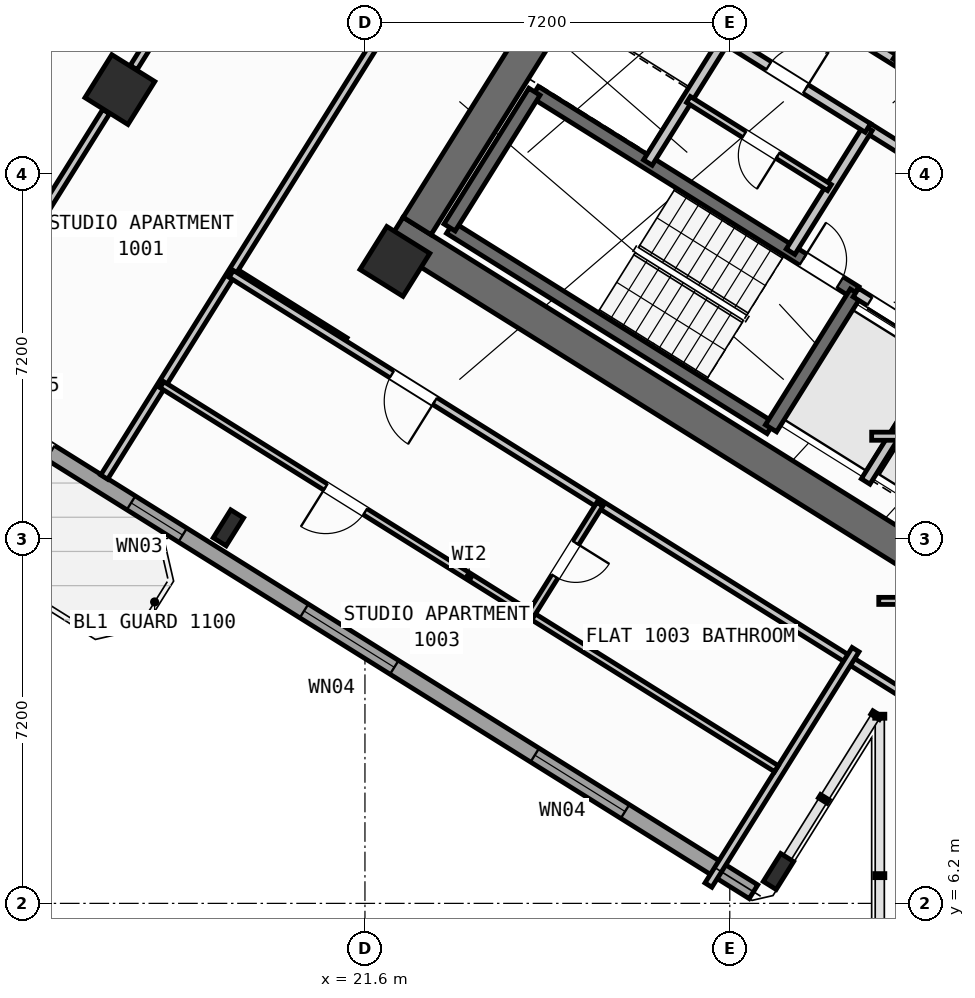
"""IFC4 building model, lengths in metres.
Left out: names, types, materials, properties, quantities, classifications, styles, units other than length and angle.
Written with IfcOpenShell. Run it as: python <this file> out.ifc"""

import sys

from ifc_helpers import new_model, si_unit, direction, frame, frame_2d, origin, origin_2d, place, context, subcontext, project, spatial, rectangle, hollow_rectangle, i_section, extrude, source, transform, mapped, element, fill, save


model = new_model("IFC4")
c1 = context("Model", 3, precision=1e-05, world=origin(), true_north=direction((0.0, 1.0)))
c2 = subcontext(c1, "Body", "Model", "MODEL_VIEW")
j1 = project(units=[si_unit("LENGTHUNIT", "METRE"), si_unit("PLANEANGLEUNIT", "RADIAN")], contexts=[c1])
p1 = place(None, origin())
s1 = spatial("IfcSite", under=j1, at=p1, CompositionType="ELEMENT")
p2 = place(p1, origin())
s2 = spatial("IfcBuilding", under=s1, at=p2, CompositionType="ELEMENT")
p3 = place(p2, frame((0.0, 0.0, 42.0)))
s3 = spatial("IfcBuildingStorey", under=s2, at=p3, CompositionType="ELEMENT", Elevation=42.0)
p4 = place(p3, frame((33.409, 12.45, 0.0), z_axis=(0.0, 0.0, 1.0), x_axis=(-0.848051132073, 0.529914405721, 0.0)))
e1 = element("IfcWall", 1, at=p4, inside=s3, PredefinedType="SHEAR", context=c2, shape_type="SweptSolid", body=[
    extrude(rectangle(XDim=13.24, YDim=0.65, at=frame_2d((6.62, 0.0))), origin(), (0.0, 0.0, 1.0), 3.35),
])
p5 = place(p3, frame((26.007, 24.976, 0.0), z_axis=(0.0, 0.0, 1.0), x_axis=(-0.529916319127, -0.848049936456, 0.0)))
e2 = element("IfcWall", 2, at=p5, inside=s3, PredefinedType="SHEAR", context=c2, shape_type="SweptSolid", body=[
    extrude(rectangle(XDim=6.375, YDim=0.65, at=frame_2d((3.188, 0.0))), origin(), (0.0, 0.0, 1.0), 3.35),
])
m1 = source(origin(), c2, "Body", "SweptSolid", [
    extrude(i_section(OverallWidth=0.3, OverallDepth=0.65, WebThickness=0.016, FlangeThickness=0.031, at=origin_2d()), origin(), (0.0, 0.0, 1.0), 3.6),
])
p6 = place(p3, frame((29.761, 6.829, 0.0), z_axis=(0.0, 0.0, 1.0), x_axis=(-0.848048096156, 0.529919264233, 0.0)))
e3 = element("IfcColumn", 3, at=p6, inside=s3, PredefinedType="COLUMN", context=c2, shape_type="MappedRepresentation", body=[
    mapped(m1, transform((0.0, 0.0, 0.0), scale=1.0)),
])
m2 = source(origin(), c2, "Body", "SweptSolid", [
    extrude(hollow_rectangle(XDim=1.0, YDim=1.0, WallThickness=0.04, at=origin_2d()), origin(), (0.0, 0.0, 1.0), 3.6),
])
p7 = place(p3, frame((22.191, 18.87, 0.0), z_axis=(0.0, 0.0, 1.0), x_axis=(-0.848048096156, 0.529919264233, 0.0)))
e4 = element("IfcColumn", 4, at=p7, inside=s3, PredefinedType="COLUMN", context=c2, shape_type="MappedRepresentation", body=[
    mapped(m2, transform((0.0, 0.0, 0.0), scale=1.0)),
])
p8 = place(p3, frame((18.906, 13.612, 0.0), z_axis=(0.0, 0.0, 1.0), x_axis=(-0.848048096156, 0.529919264233, 0.0)))
e5 = element("IfcColumn", 5, at=p8, inside=s3, PredefinedType="COLUMN", context=c2, shape_type="MappedRepresentation", body=[
    mapped(m1, transform((0.0, 0.0, 0.0), scale=1.0)),
])
p9 = place(p3, frame((16.764, 22.261, 0.0), z_axis=(0.0, 0.0, 1.0), x_axis=(-0.848048096156, 0.529919264233, 0.0)))
e6 = element("IfcColumn", 6, at=p9, inside=s3, PredefinedType="COLUMN", context=c2, shape_type="MappedRepresentation", body=[
    mapped(m2, transform((0.0, 0.0, 0.0), scale=1.0)),
])
p10 = place(p3, frame((29.268, 6.429, 0.0), z_axis=(0.0, 0.0, 1.0), x_axis=(-0.848049971435, 0.529916263149, 0.0)))
e7 = element("IfcWall", 7, at=p10, inside=s3, PredefinedType="STANDARD", context=c2, shape_type="SweptSolid", body=[
    extrude(rectangle(XDim=31.588, YDim=0.32, at=frame_2d((15.794, 0.0))), origin(), (0.0, 0.0, 1.0), 3.35),
])
p11 = place(p10, frame((16.362, 0.0, 0.0)))
e8 = element("IfcOpeningElement", 8, at=p11, cuts=e7, PredefinedType="OPENING", context=c2, shape_type="SweptSolid", body=[
    extrude(rectangle(XDim=1.2, YDim=2.15, at=frame_2d((0.6, 1.075))), frame((0.0, 0.17, 0.0), z_axis=(0.0, -1.0, 0.0), x_axis=(1.0, 0.0, 0.0)), (0.0, 0.0, 1.0), 0.34),
])
p12 = place(p10, frame((2.989, 0.0, 0.8)))
e9 = element("IfcOpeningElement", 9, at=p12, cuts=e7, PredefinedType="OPENING", context=c2, shape_type="SweptSolid", body=[
    extrude(rectangle(XDim=2.1, YDim=1.55, at=frame_2d((1.05, 0.775))), frame((0.0, 0.17, 0.0), z_axis=(0.0, -1.0, 0.0), x_axis=(1.0, 0.0, 0.0)), (0.0, 0.0, 1.0), 0.34),
])
p13 = place(p10, frame((8.359, 0.0, 0.8)))
e10 = element("IfcOpeningElement", 10, at=p13, cuts=e7, PredefinedType="OPENING", context=c2, shape_type="SweptSolid", body=[
    extrude(rectangle(XDim=2.1, YDim=1.55, at=frame_2d((1.05, 0.775))), frame((0.0, 0.17, 0.0), z_axis=(0.0, -1.0, 0.0), x_axis=(1.0, 0.0, 0.0)), (0.0, 0.0, 1.0), 0.34),
])
p14 = place(p10, frame((13.284, 0.0, 0.95)))
e11 = element("IfcOpeningElement", 11, at=p14, cuts=e7, PredefinedType="OPENING", context=c2, shape_type="SweptSolid", body=[
    extrude(rectangle(XDim=1.2, YDim=1.4, at=frame_2d((0.6, 0.7))), frame((0.0, 0.17, 0.0), z_axis=(0.0, -1.0, 0.0), x_axis=(1.0, 0.0, 0.0)), (0.0, 0.0, 1.0), 0.34),
])
p15 = place(p10, frame((20.39, 0.0, 0.95)))
e12 = element("IfcOpeningElement", 12, at=p15, cuts=e7, PredefinedType="OPENING", context=c2, shape_type="SweptSolid", body=[
    extrude(rectangle(XDim=1.2, YDim=1.4, at=frame_2d((0.6, 0.7))), frame((0.0, 0.17, 0.0), z_axis=(0.0, -1.0, 0.0), x_axis=(1.0, 0.0, 0.0)), (0.0, 0.0, 1.0), 0.34),
])
p16 = place(p10, frame((23.715, 0.0, 1.0)))
e13 = element("IfcOpeningElement", 13, at=p16, cuts=e7, PredefinedType="OPENING", context=c2, shape_type="SweptSolid", body=[
    extrude(rectangle(XDim=0.9, YDim=1.25, at=frame_2d((0.45, 0.625))), frame((0.0, 0.17, 0.0), z_axis=(0.0, -1.0, 0.0), x_axis=(1.0, 0.0, 0.0)), (0.0, 0.0, 1.0), 0.34),
])
p17 = place(p10, frame((27.481, 0.0, 0.8)))
e14 = element("IfcOpeningElement", 14, at=p17, cuts=e7, PredefinedType="OPENING", context=c2, shape_type="SweptSolid", body=[
    extrude(rectangle(XDim=2.1, YDim=1.55, at=frame_2d((1.05, 0.775))), frame((0.0, 0.17, 0.0), z_axis=(0.0, -1.0, 0.0), x_axis=(1.0, 0.0, 0.0)), (0.0, 0.0, 1.0), 0.34),
])
p18 = place(p3, frame((29.605, 15.581, 0.0), z_axis=(0.0, 0.0, 1.0), x_axis=(-0.848036911448, 0.529937163087, 0.0)))
e15 = element("IfcWall", 15, at=p18, inside=s3, PredefinedType="SHEAR", context=c2, shape_type="SweptSolid", body=[
    extrude(rectangle(XDim=7.46, YDim=0.26, at=frame_2d((3.73, 0.0))), origin(), (0.0, 0.0, 1.0), 3.35),
])
p19 = place(p3, frame((31.28, 18.261, 0.0), z_axis=(0.0, 0.0, 1.0), x_axis=(-0.848051618787, 0.529913626805, 0.0)))
e16 = element("IfcWall", 16, at=p19, inside=s3, PredefinedType="SHEAR", context=c2, shape_type="SweptSolid", body=[
    extrude(rectangle(XDim=7.46, YDim=0.26, at=frame_2d((3.73, 0.0))), origin(), (0.0, 0.0, 1.0), 3.35),
])
p20 = place(p19, frame((0.36, 0.0, 0.0)))
e17 = element("IfcOpeningElement", 17, at=p20, cuts=e16, PredefinedType="OPENING", context=c2, shape_type="SweptSolid", body=[
    extrude(rectangle(XDim=0.86, YDim=2.05, at=frame_2d((0.43, 1.025))), frame((0.0, 0.14, 0.0), z_axis=(0.0, -1.0, 0.0), x_axis=(1.0, 0.0, 0.0)), (0.0, 0.0, 1.0), 0.28),
])
p21 = place(p3, frame((31.288, 18.256, 0.0), z_axis=(0.0, 0.0, 1.0), x_axis=(-0.529943379326, -0.848033026897, 0.0)))
e18 = element("IfcWall", 18, at=p21, inside=s3, PredefinedType="SHEAR", context=c2, shape_type="SweptSolid", body=[
    extrude(rectangle(XDim=3.16, YDim=0.26, at=frame_2d((1.58, 0.0))), origin(), (0.0, 0.0, 1.0), 3.35),
])
p22 = place(p3, frame((24.945, 22.22, 0.0), z_axis=(0.0, 0.0, 1.0), x_axis=(-0.529908658664, -0.84805472316, 0.0)))
e19 = element("IfcWall", 19, at=p22, inside=s3, PredefinedType="SHEAR", context=c2, shape_type="SweptSolid", body=[
    extrude(rectangle(XDim=3.16, YDim=0.26, at=frame_2d((1.58, 0.0))), origin(), (0.0, 0.0, 1.0), 3.35),
])
p23 = place(p3, frame((38.046, 21.108, 0.0), z_axis=(0.0, 0.0, 1.0), x_axis=(-0.848054434086, 0.529909121291, 0.0)))
e20 = element("IfcWall", 20, at=p23, inside=s3, PredefinedType="SHEAR", context=c2, shape_type="SweptSolid", body=[
    extrude(rectangle(XDim=7.33, YDim=0.26, at=frame_2d((3.665, 0.0))), origin(), (0.0, 0.0, 1.0), 3.35),
])
p24 = place(p23, frame((0.22, 0.0, 0.0)))
e21 = element("IfcOpeningElement", 21, at=p24, cuts=e20, PredefinedType="OPENING", context=c2, shape_type="SweptSolid", body=[
    extrude(rectangle(XDim=1.1, YDim=2.1, at=frame_2d((0.55, 1.05))), frame((0.0, 0.14, 0.0), z_axis=(0.0, -1.0, 0.0), x_axis=(1.0, 0.0, 0.0)), (0.0, 0.0, 1.0), 0.28),
])
p25 = place(p3, frame((34.848, 16.031, 0.0), z_axis=(0.0, 0.0, 1.0), x_axis=(-0.848044042236, 0.529925751807, 0.0)))
e22 = element("IfcWall", 22, at=p25, inside=s3, PredefinedType="STANDARD", context=c2, shape_type="SweptSolid", body=[
    extrude(rectangle(XDim=4.198, YDim=0.2, at=frame_2d((2.099, 0.0))), origin(), (0.0, 0.0, 1.0), 3.34),
])
p26 = place(p25, frame((0.348, 0.0, 0.0)))
e23 = element("IfcOpeningElement", 23, at=p26, cuts=e22, PredefinedType="OPENING", context=c2, shape_type="SweptSolid", body=[
    extrude(rectangle(XDim=1.3, YDim=2.2, at=frame_2d((0.65, 1.1))), frame((0.0, 0.11, 0.0), z_axis=(0.0, -1.0, 0.0), x_axis=(1.0, 0.0, 0.0)), (0.0, 0.0, 1.0), 0.22),
])
p27 = place(p25, frame((2.423, 0.0, 0.0)))
e24 = element("IfcOpeningElement", 24, at=p27, cuts=e22, PredefinedType="OPENING", context=c2, shape_type="SweptSolid", body=[
    extrude(rectangle(XDim=1.45, YDim=2.25, at=frame_2d((0.725, 1.125))), frame((0.0, 0.11, 0.0), z_axis=(0.0, -1.0, 0.0), x_axis=(1.0, 0.0, 0.0)), (0.0, 0.0, 1.0), 0.22),
])
p28 = place(p3, frame((36.374, 18.474, 0.0), z_axis=(0.0, 0.0, 1.0), x_axis=(-0.848051071577, 0.529914502535, 0.0)))
e25 = element("IfcWall", 25, at=p28, inside=s3, PredefinedType="STANDARD", context=c2, shape_type="SweptSolid", body=[
    extrude(rectangle(XDim=5.718, YDim=0.2, at=frame_2d((2.859, 0.0))), origin(), (0.0, 0.0, 1.0), 3.34),
])
p29 = place(p28, frame((2.498, 0.0, 0.0)))
e26 = element("IfcOpeningElement", 26, at=p29, cuts=e25, PredefinedType="OPENING", context=c2, shape_type="SweptSolid", body=[
    extrude(rectangle(XDim=1.15, YDim=2.1, at=frame_2d((0.575, 1.05))), frame((0.0, 0.11, 0.0), z_axis=(0.0, -1.0, 0.0), x_axis=(1.0, 0.0, 0.0)), (0.0, 0.0, 1.0), 0.22),
])
p30 = place(p3, frame((32.108, 22.814, 0.0), z_axis=(0.0, 0.0, 1.0), x_axis=(-0.848042229521, 0.529928652696, 0.0)))
e27 = element("IfcWall", 27, at=p30, inside=s3, PredefinedType="STANDARD", context=c2, shape_type="SweptSolid", body=[
    extrude(rectangle(XDim=5.62, YDim=0.2, at=frame_2d((2.81, 0.0))), origin(), (0.0, 0.0, 1.0), 3.34),
])
p31 = place(p3, frame((32.982, 24.213, 0.0), z_axis=(0.0, 0.0, 1.0), x_axis=(-0.529839334948, -0.84809803628, 0.0)))
e28 = element("IfcWall", 28, at=p31, inside=s3, PredefinedType="STANDARD", context=c2, shape_type="SweptSolid", body=[
    extrude(rectangle(XDim=1.65, YDim=0.2, at=frame_2d((0.825, 0.0))), origin(), (0.0, 0.0, 1.0), 3.34),
])
p32 = place(p3, frame((33.029, 17.003, 0.0), z_axis=(0.0, 0.0, 1.0), x_axis=(-0.529916267533, -0.848049968695, 0.0)))
e29 = element("IfcWall", 29, at=p32, inside=s3, PredefinedType="STANDARD", context=c2, shape_type="SweptSolid", body=[
    extrude(rectangle(XDim=2.92, YDim=0.2, at=frame_2d((1.46, 0.0))), origin(), (0.0, 0.0, 1.0), 3.34),
])
for number, where, z_axis, x_axis in (
    (30, (31.525, 21.504, 0.0), (0.0, 0.0, 1.0), (-0.53, -0.848, 0.0)),
    (31, (28.71, 23.263, 0.0), (0.0, 0.0, 1.0), (-0.53, -0.848, 0.0)),
):
    element("IfcWall", number, at=place(p3, frame(where, z_axis=z_axis, x_axis=x_axis)), inside=s3, PredefinedType="STANDARD", context=c2, shape_type="SweptSolid", body=[
        extrude(rectangle(XDim=2.88, YDim=0.2, at=frame_2d((1.44, 0.0))), origin(), (0.0, 0.0, 1.0), 3.34),
    ])
p33 = place(p3, frame((31.525, 21.504, 0.0), z_axis=(0.0, 0.0, 1.0), x_axis=(-0.848044998614, 0.529924221305, 0.0)))
e32 = element("IfcWall", 32, at=p33, inside=s3, PredefinedType="STANDARD", context=c2, shape_type="SweptSolid", body=[
    extrude(rectangle(XDim=6.168, YDim=0.2, at=frame_2d((3.084, 0.0))), origin(), (0.0, 0.0, 1.0), 3.34),
])
p34 = place(p33, frame((4.4, 0.0, 0.0)))
e33 = element("IfcOpeningElement", 33, at=p34, cuts=e32, PredefinedType="OPENING", context=c2, shape_type="SweptSolid", body=[
    extrude(rectangle(XDim=0.86, YDim=2.05, at=frame_2d((0.43, 1.025))), frame((0.0, 0.11, 0.0), z_axis=(0.0, -1.0, 0.0), x_axis=(1.0, 0.0, 0.0)), (0.0, 0.0, 1.0), 0.22),
])
p35 = place(p33, frame((1.45, 0.0, 0.0)))
e34 = element("IfcOpeningElement", 34, at=p35, cuts=e32, PredefinedType="OPENING", context=c2, shape_type="SweptSolid", body=[
    extrude(rectangle(XDim=0.86, YDim=2.05, at=frame_2d((0.43, 1.025))), frame((0.0, 0.11, 0.0), z_axis=(0.0, -1.0, 0.0), x_axis=(1.0, 0.0, 0.0)), (0.0, 0.0, 1.0), 0.22),
])
p36 = place(p3, frame((30.766, 20.327, 0.0), z_axis=(0.0, 0.0, 1.0), x_axis=(-0.848052663127, 0.529911955482, 0.0)))
e35 = element("IfcWall", 35, at=p36, inside=s3, PredefinedType="PLUMBINGWALL", context=c2, shape_type="SweptSolid", body=[
    extrude(rectangle(XDim=3.28, YDim=0.14, at=frame_2d((1.64, 0.0))), origin(), (0.0, 0.0, 1.0), 3.34),
])
p37 = place(p36, frame((1.2, 0.0, 0.0)))
e36 = element("IfcOpeningElement", 36, at=p37, cuts=e35, PredefinedType="OPENING", context=c2, shape_type="SweptSolid", body=[
    extrude(rectangle(XDim=0.78, YDim=2.05, at=frame_2d((0.39, 1.025))), frame((0.0, 0.08, 0.0), z_axis=(0.0, -1.0, 0.0), x_axis=(1.0, 0.0, 0.0)), (0.0, 0.0, 1.0), 0.16),
])
p38 = place(p3, frame((21.206, 17.292, 0.0), z_axis=(0.0, 0.0, 1.0), x_axis=(-0.848050851465, 0.529914854792, 0.0)))
e37 = element("IfcWall", 37, at=p38, inside=s3, PredefinedType="PARTITIONING", context=c2, shape_type="SweptSolid", body=[
    extrude(rectangle(XDim=2.61, YDim=0.16, at=frame_2d((1.305, 0.0))), origin(), (0.0, 0.0, 1.0), 3.34),
])
p39 = place(p3, frame((25.807, 29.582, 0.0), z_axis=(0.0, 0.0, 1.0), x_axis=(-0.529918119251, -0.84804881162, 0.0)))
e38 = element("IfcWall", 38, at=p39, inside=s3, PredefinedType="PARTITIONING", context=c2, shape_type="SweptSolid", body=[
    extrude(rectangle(XDim=17.65, YDim=0.16, at=frame_2d((8.825, 0.0))), origin(), (0.0, 0.0, 1.0), 3.34),
])
p40 = place(p3, frame((20.361, 28.018, 0.0), z_axis=(0.0, 0.0, 1.0), x_axis=(-0.529915015264, -0.848050751193, 0.0)))
e39 = element("IfcWall", 39, at=p40, inside=s3, PredefinedType="PARTITIONING", context=c2, shape_type="SweptSolid", body=[
    extrude(rectangle(XDim=6.276, YDim=0.16, at=frame_2d((3.138, 0.0))), origin(), (0.0, 0.0, 1.0), 2.725),
])
p41 = place(p3, frame((16.492, 21.827, 0.0), z_axis=(0.0, 0.0, 1.0), x_axis=(-0.529904608059, -0.848057254175, 0.0)))
e40 = element("IfcWall", 40, at=p41, inside=s3, PredefinedType="PARTITIONING", context=c2, shape_type="SweptSolid", body=[
    extrude(rectangle(XDim=5.351, YDim=0.16, at=frame_2d((2.675, 0.0))), origin(), (0.0, 0.0, 1.0), 2.725),
])
p42 = place(p3, frame((17.861, 31.505, 0.0), z_axis=(0.0, 0.0, 1.0), x_axis=(-0.529928839727, -0.848042112649, 0.0)))
e41 = element("IfcWall", 41, at=p42, inside=s3, PredefinedType="PARTITIONING", context=c2, shape_type="SweptSolid", body=[
    extrude(rectangle(XDim=15.34, YDim=0.11, at=frame_2d((7.67, 0.0))), origin(), (0.0, 0.0, 1.0), 3.34),
])
p43 = place(p42, frame((0.35, 0.0, 0.0)))
e42 = element("IfcOpeningElement", 42, at=p43, cuts=e41, PredefinedType="OPENING", context=c2, shape_type="SweptSolid", body=[
    extrude(rectangle(XDim=0.92, YDim=2.08, at=frame_2d((0.46, 1.04))), frame((0.0, 0.065, 0.0), z_axis=(0.0, -1.0, 0.0), x_axis=(1.0, 0.0, 0.0)), (0.0, 0.0, 1.0), 0.13),
])
p44 = place(p3, frame((32.164, 10.374, 0.0), z_axis=(0.0, 0.0, 1.0), x_axis=(-0.848044107957, 0.529925646633, 0.0)))
e43 = element("IfcWall", 43, at=p44, inside=s3, PredefinedType="PARTITIONING", context=c2, shape_type="SweptSolid", body=[
    extrude(rectangle(XDim=15.57, YDim=0.16, at=frame_2d((7.785, 0.0))), origin(), (0.0, 0.0, 1.0), 3.34),
])
p45 = place(p44, frame((10.83, 0.0, 0.0)))
e44 = element("IfcOpeningElement", 44, at=p45, cuts=e43, PredefinedType="OPENING", context=c2, shape_type="SweptSolid", body=[
    extrude(rectangle(XDim=1.0, YDim=2.1, at=frame_2d((0.5, 1.05))), frame((0.0, 0.09, 0.0), z_axis=(0.0, -1.0, 0.0), x_axis=(1.0, 0.0, 0.0)), (0.0, 0.0, 1.0), 0.18),
])
p46 = place(p3, frame((31.282, 11.208, 0.0), z_axis=(0.0, 0.0, 1.0), x_axis=(-0.529938869374, -0.84803584519, 0.0)))
e45 = element("IfcWall", 45, at=p46, inside=s3, PredefinedType="PARTITIONING", context=c2, shape_type="SweptSolid", body=[
    extrude(rectangle(XDim=5.48, YDim=0.16, at=frame_2d((2.74, 0.0))), origin(), (0.0, 0.0, 1.0), 3.34),
])
p47 = place(p3, frame((29.72, 8.859, 0.0), z_axis=(0.0, 0.0, 1.0), x_axis=(-0.848049134363, 0.529917602752, 0.0)))
e46 = element("IfcWall", 46, at=p47, inside=s3, PredefinedType="PLUMBINGWALL", context=c2, shape_type="SweptSolid", body=[
    extrude(rectangle(XDim=14.3, YDim=0.14, at=frame_2d((7.15, 0.0))), origin(), (0.0, 0.0, 1.0), 3.34),
])
p48 = place(p47, frame((9.57, 0.0, 0.0)))
e47 = element("IfcOpeningElement", 47, at=p48, cuts=e46, PredefinedType="OPENING", context=c2, shape_type="SweptSolid", body=[
    extrude(rectangle(XDim=0.92, YDim=2.08, at=frame_2d((0.46, 1.04))), frame((0.0, 0.08, 0.0), z_axis=(0.0, -1.0, 0.0), x_axis=(1.0, 0.0, 0.0)), (0.0, 0.0, 1.0), 0.16),
])
p49 = place(p3, frame((26.237, 14.078, 0.0), z_axis=(0.0, 0.0, 1.0), x_axis=(-0.52995640672, -0.848024885824, 0.0)))
e48 = element("IfcWall", 48, at=p49, inside=s3, PredefinedType="PLUMBINGWALL", context=c2, shape_type="SweptSolid", body=[
    extrude(rectangle(XDim=2.58, YDim=0.14, at=frame_2d((1.29, 0.0))), origin(), (0.0, 0.0, 1.0), 3.34),
])
p50 = place(p49, frame((0.9, 0.0, 0.0)))
e49 = element("IfcOpeningElement", 49, at=p50, cuts=e48, PredefinedType="OPENING", context=c2, shape_type="SweptSolid", body=[
    extrude(rectangle(XDim=0.78, YDim=2.05, at=frame_2d((0.39, 1.025))), frame((0.0, 0.08, 0.0), z_axis=(0.0, -1.0, 0.0), x_axis=(1.0, 0.0, 0.0)), (0.0, 0.0, 1.0), 0.16),
])
p51 = place(p3, frame((31.6, 15.42, 0.0), z_axis=(0.0, 0.0, 1.0), x_axis=(1.0, 0.0, 0.0)))
e50 = element("IfcWall", 50, at=p51, inside=s3, PredefinedType="PARTITIONING", context=c2, shape_type="SweptSolid", body=[
    extrude(rectangle(XDim=2.866, YDim=0.16, at=frame_2d((1.433, 0.0))), origin(), (0.0, 0.0, 1.0), 3.34),
])
p52 = place(p3, frame((31.74, 12.17, 0.0), z_axis=(0.0, 0.0, 1.0), x_axis=(1.0, 0.0, 0.0)))
e51 = element("IfcWall", 51, at=p52, inside=s3, PredefinedType="PLUMBINGWALL", context=c2, shape_type="SweptSolid", body=[
    extrude(rectangle(XDim=0.754, YDim=0.14, at=frame_2d((0.377, 0.0))), origin(), (0.0, 0.0, 1.0), 3.34),
])
m3 = source(origin(), c2, "Body", "SweptSolid", [
    extrude(rectangle(XDim=2.1, YDim=1.55, at=frame_2d((1.05, 0.775))), frame((0.0, 0.03, 0.0), z_axis=(0.0, -1.0, 0.0), x_axis=(1.0, 0.0, 0.0)), (0.0, 0.0, 1.0), 0.06),
])
p53 = place(p12, origin())
e52 = element("IfcWindow", 52, at=p53, inside=s3, PartitioningType="SINGLE_PANEL", PredefinedType="WINDOW", context=c2, shape_type="MappedRepresentation", body=[
    mapped(m3, transform((0.0, 0.0, 0.0), scale=1.0)),
])
fill(e9, e52)
p54 = place(p13, origin())
e53 = element("IfcWindow", 53, at=p54, inside=s3, PartitioningType="SINGLE_PANEL", PredefinedType="WINDOW", context=c2, shape_type="MappedRepresentation", body=[
    mapped(m3, transform((0.0, 0.0, 0.0), scale=1.0)),
])
fill(e10, e53)
m4 = source(origin(), c2, "Body", "SweptSolid", [
    extrude(rectangle(XDim=1.2, YDim=1.4, at=frame_2d((0.6, 0.7))), frame((0.0, 0.03, 0.0), z_axis=(0.0, -1.0, 0.0), x_axis=(1.0, 0.0, 0.0)), (0.0, 0.0, 1.0), 0.06),
])
p55 = place(p14, origin())
e54 = element("IfcWindow", 54, at=p55, inside=s3, PartitioningType="SINGLE_PANEL", PredefinedType="WINDOW", context=c2, shape_type="MappedRepresentation", body=[
    mapped(m4, transform((0.0, 0.0, 0.0), scale=1.0)),
])
fill(e11, e54)
m5 = source(origin(), c2, "Body", "SweptSolid", [
    extrude(rectangle(XDim=0.86, YDim=2.05, at=frame_2d((0.43, 1.025))), frame((0.0, 0.025, 0.0), z_axis=(0.0, -1.0, 0.0), x_axis=(1.0, 0.0, 0.0)), (0.0, 0.0, 1.0), 0.05),
])
p56 = place(p20, frame((0.86, 0.0, 0.0), z_axis=(0.0, 0.0, 1.0), x_axis=(-1.0, 0.0, 0.0)))
e55 = element("IfcDoor", 55, at=p56, inside=s3, OperationType="SINGLE_SWING_LEFT", PredefinedType="DOOR", context=c2, shape_type="MappedRepresentation", body=[
    mapped(m5, transform((0.0, 0.0, 0.0), scale=1.0)),
])
fill(e17, e55)
m6 = source(origin(), c2, "Body", "SweptSolid", [
    extrude(rectangle(XDim=1.45, YDim=2.25, at=frame_2d((0.725, 1.125))), frame((0.0, 0.025, 0.0), z_axis=(0.0, -1.0, 0.0), x_axis=(1.0, 0.0, 0.0)), (0.0, 0.0, 1.0), 0.05),
])
p57 = place(p27, origin())
e56 = element("IfcDoor", 56, at=p57, inside=s3, OperationType="DOUBLE_DOOR_SLIDING", PredefinedType="DOOR", context=c2, shape_type="MappedRepresentation", body=[
    mapped(m6, transform((0.0, 0.0, 0.0), scale=1.0)),
])
fill(e24, e56)
p58 = place(p35, frame((0.86, 0.0, 0.0), z_axis=(0.0, 0.0, 1.0), x_axis=(-1.0, 0.0, 0.0)))
e57 = element("IfcDoor", 57, at=p58, inside=s3, OperationType="SINGLE_SWING_RIGHT", PredefinedType="DOOR", context=c2, shape_type="MappedRepresentation", body=[
    mapped(m5, transform((0.0, 0.0, 0.0), scale=1.0)),
])
fill(e34, e57)
m7 = source(origin(), c2, "Body", "SweptSolid", [
    extrude(rectangle(XDim=0.78, YDim=2.05, at=frame_2d((0.39, 1.025))), frame((0.0, 0.025, 0.0), z_axis=(0.0, -1.0, 0.0), x_axis=(1.0, 0.0, 0.0)), (0.0, 0.0, 1.0), 0.05),
])
p59 = place(p37, origin())
e58 = element("IfcDoor", 58, at=p59, inside=s3, OperationType="SINGLE_SWING_LEFT", PredefinedType="DOOR", context=c2, shape_type="MappedRepresentation", body=[
    mapped(m7, transform((0.0, 0.0, 0.0), scale=1.0)),
])
fill(e36, e58)
m8 = source(origin(), c2, "Body", "SweptSolid", [
    extrude(rectangle(XDim=1.0, YDim=2.1, at=frame_2d((0.5, 1.05))), frame((0.0, 0.025, 0.0), z_axis=(0.0, -1.0, 0.0), x_axis=(1.0, 0.0, 0.0)), (0.0, 0.0, 1.0), 0.05),
])
p60 = place(p45, origin())
e59 = element("IfcDoor", 59, at=p60, inside=s3, OperationType="SINGLE_SWING_LEFT", PredefinedType="DOOR", context=c2, shape_type="MappedRepresentation", body=[
    mapped(m8, transform((0.0, 0.0, 0.0), scale=1.0)),
])
fill(e44, e59)
m9 = source(origin(), c2, "Body", "SweptSolid", [
    extrude(rectangle(XDim=0.92, YDim=2.08, at=frame_2d((0.46, 1.04))), frame((0.0, 0.025, 0.0), z_axis=(0.0, -1.0, 0.0), x_axis=(1.0, 0.0, 0.0)), (0.0, 0.0, 1.0), 0.05),
])
p61 = place(p48, origin())
e60 = element("IfcDoor", 60, at=p61, inside=s3, OperationType="SINGLE_SWING_RIGHT", PredefinedType="DOOR", context=c2, shape_type="MappedRepresentation", body=[
    mapped(m9, transform((0.0, 0.0, 0.0), scale=1.0)),
])
fill(e47, e60)
p62 = place(p50, origin())
e61 = element("IfcDoor", 61, at=p62, inside=s3, OperationType="SINGLE_SWING_LEFT", PredefinedType="DOOR", context=c2, shape_type="MappedRepresentation", body=[
    mapped(m7, transform((0.0, 0.0, 0.0), scale=1.0)),
])
fill(e49, e61)
save(model, sys.argv[1])
